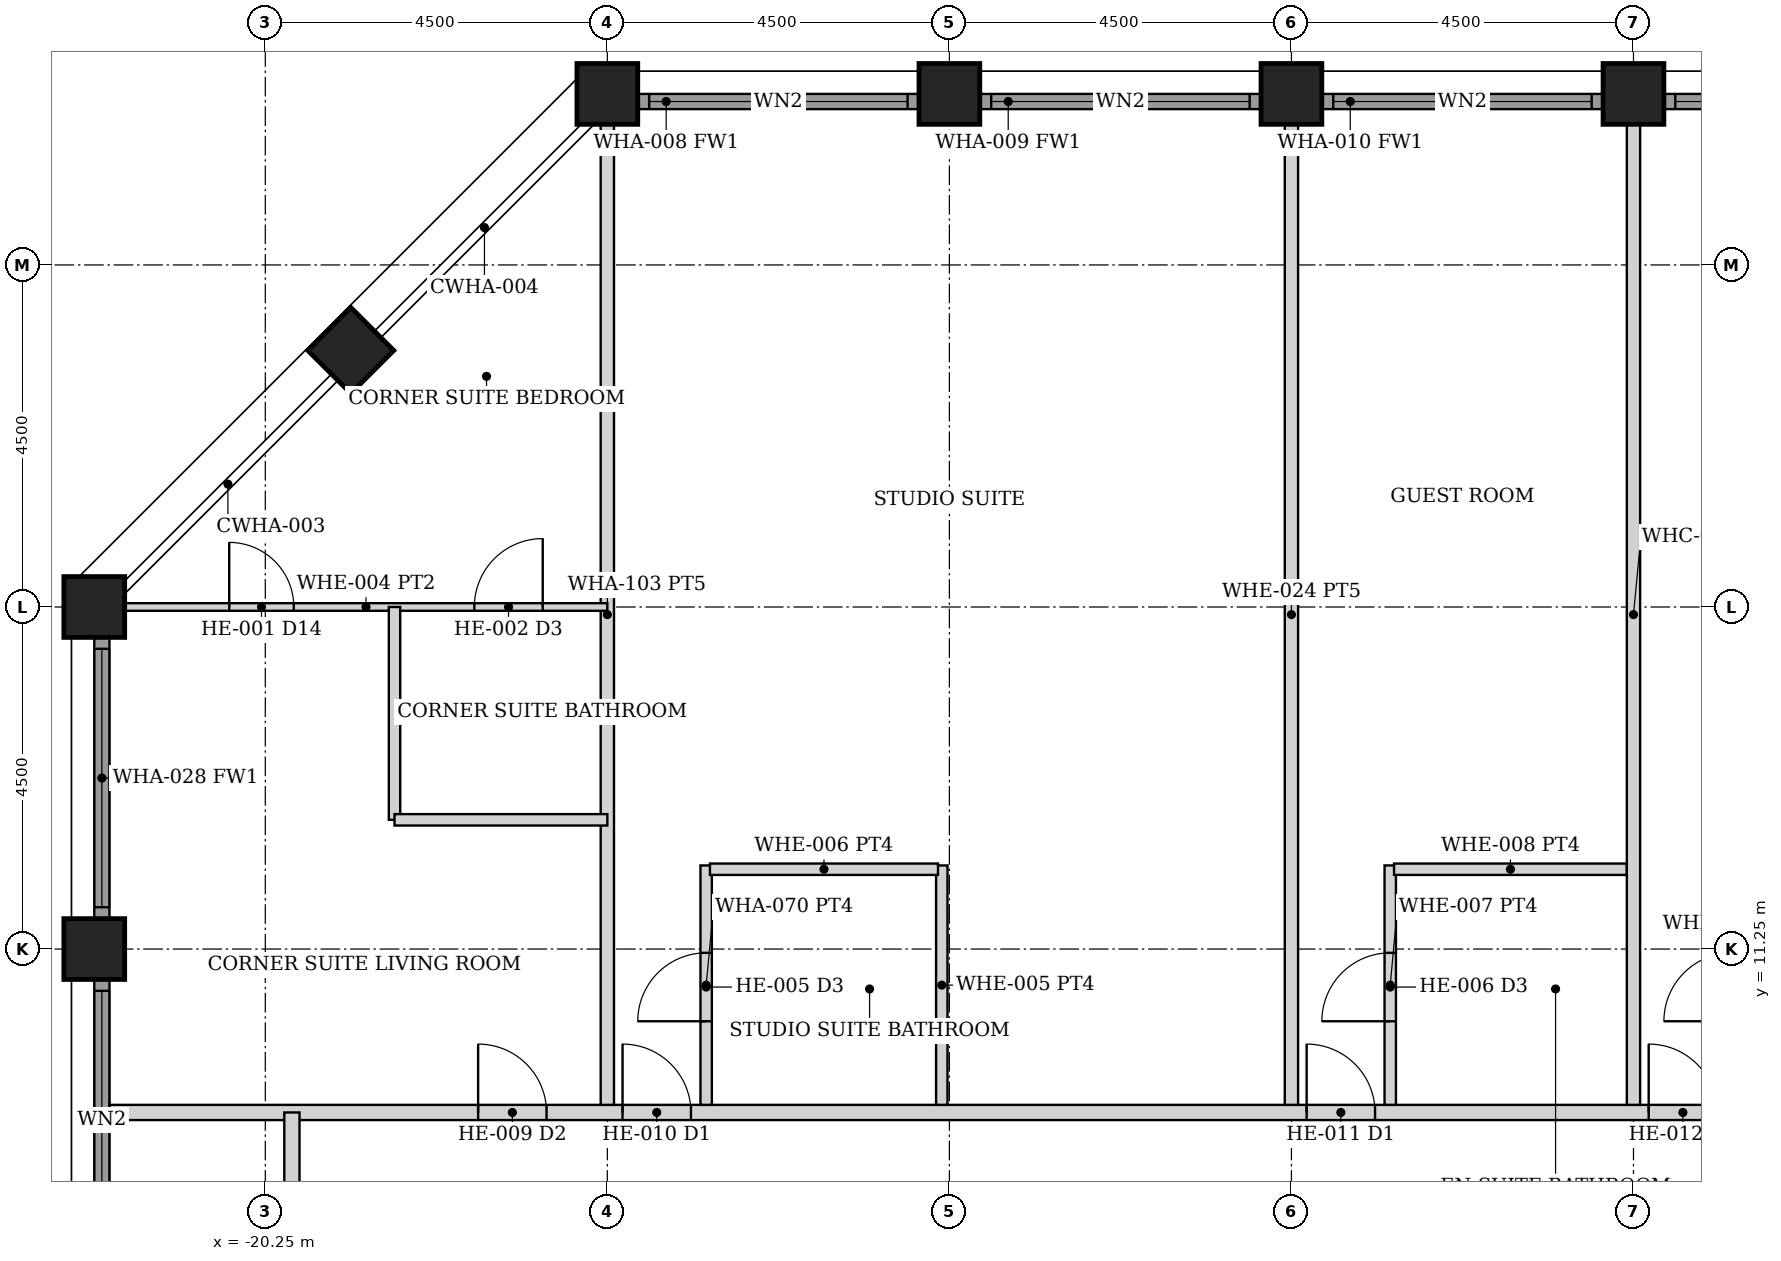
"""IFC4 building model, lengths in metres.
Left out: names, types, materials, properties, quantities, classifications, styles, units other than length and angle.
Written with IfcOpenShell. Run it as: python <this file> out.ifc"""

import sys

from ifc_helpers import new_model, si_unit, direction, frame, frame_2d, origin, origin_2d, place, context, subcontext, project, spatial, rectangle, hollow_rectangle, extrude, element, fill, save


model = new_model("IFC4")
c1 = context("Model", 3, precision=1e-05, world=origin(), true_north=direction((0.0, 1.0)))
c2 = subcontext(c1, "Body", "Model", "MODEL_VIEW")
j1 = project(units=[si_unit("LENGTHUNIT", "METRE"), si_unit("PLANEANGLEUNIT", "RADIAN")], contexts=[c1])
p1 = place(None, origin())
s1 = spatial("IfcSite", under=j1, at=p1, CompositionType="ELEMENT")
p2 = place(p1, origin())
s2 = spatial("IfcBuilding", under=s1, at=p2, CompositionType="ELEMENT")
p3 = place(p2, frame((0.0, 0.0, 161.6)))
s3 = spatial("IfcBuildingStorey", under=s2, at=p3, CompositionType="ELEMENT", Elevation=161.6)
for number, where, z_axis, x_axis in (
    (1, (-15.75, 22.5, 0.0), (0.0, 0.0, 1.0), (0.0, 1.0, 0.0)),
    (2, (-11.25, 22.5, 0.0), (0.0, 0.0, 1.0), (0.0, 1.0, 0.0)),
    (3, (-6.75, 22.5, 0.0), (0.0, 0.0, 1.0), (0.0, 1.0, 0.0)),
    (4, (-2.25, 22.5, 0.0), (0.0, 0.0, 1.0), (0.0, 1.0, 0.0)),
    (5, (-22.5, 11.25, 0.0), (0.0, 0.0, 1.0), (1.0, 0.0, 0.0)),
    (6, (-22.5, 15.75, 0.0), (0.0, 0.0, 1.0), (1.0, 0.0, 0.0)),
    (7, (-19.125, 19.125, 0.0), (0.0, 0.0, 1.0), (0.707, -0.707, 0.0)),
):
    element("IfcColumn", number, at=place(p3, frame(where, z_axis=z_axis, x_axis=x_axis)), inside=s3, PredefinedType="COLUMN", context=c2, shape_type="SweptSolid", body=[
        extrude(hollow_rectangle(XDim=0.8, YDim=0.8, WallThickness=0.05, at=origin_2d()), origin(), (0.0, 0.0, 1.0), 3.6),
    ])
p4 = place(p3, frame((-15.345, 22.4, 0.0), z_axis=(0.0, 0.0, 1.0), x_axis=(1.0, 0.0, 0.0)))
e8 = element("IfcWall", 8, at=p4, inside=s3, PredefinedType="SOLIDWALL", context=c2, shape_type="SweptSolid", body=[
    extrude(rectangle(XDim=3.69, YDim=0.2, at=frame_2d((1.845, 0.0))), origin(), (0.0, 0.0, 1.0), 2.479),
])
p5 = place(p4, frame((0.145, 0.0, 0.3)))
e9 = element("IfcOpeningElement", 9, at=p5, cuts=e8, PredefinedType="OPENING", context=c2, shape_type="SweptSolid", body=[
    extrude(rectangle(XDim=3.4, YDim=2.029, at=frame_2d((1.7, 1.015))), frame((0.0, 0.11, 0.0), z_axis=(0.0, -1.0, 0.0), x_axis=(1.0, 0.0, 0.0)), (0.0, 0.0, 1.0), 0.22),
])
p6 = place(p3, frame((-10.845, 22.4, 0.0), z_axis=(0.0, 0.0, 1.0), x_axis=(1.0, 0.0, 0.0)))
e10 = element("IfcWall", 10, at=p6, inside=s3, PredefinedType="SOLIDWALL", context=c2, shape_type="SweptSolid", body=[
    extrude(rectangle(XDim=3.69, YDim=0.2, at=frame_2d((1.845, 0.0))), origin(), (0.0, 0.0, 1.0), 2.479),
])
p7 = place(p6, frame((0.145, 0.0, 0.3)))
e11 = element("IfcOpeningElement", 11, at=p7, cuts=e10, PredefinedType="OPENING", context=c2, shape_type="SweptSolid", body=[
    extrude(rectangle(XDim=3.4, YDim=2.029, at=frame_2d((1.7, 1.015))), frame((0.0, 0.11, 0.0), z_axis=(0.0, -1.0, 0.0), x_axis=(1.0, 0.0, 0.0)), (0.0, 0.0, 1.0), 0.22),
])
p8 = place(p3, frame((-6.345, 22.4, 0.0), z_axis=(0.0, 0.0, 1.0), x_axis=(1.0, 0.0, 0.0)))
e12 = element("IfcWall", 12, at=p8, inside=s3, PredefinedType="SOLIDWALL", context=c2, shape_type="SweptSolid", body=[
    extrude(rectangle(XDim=3.69, YDim=0.2, at=frame_2d((1.845, 0.0))), origin(), (0.0, 0.0, 1.0), 2.479),
])
p9 = place(p8, frame((0.145, 0.0, 0.3)))
e13 = element("IfcOpeningElement", 13, at=p9, cuts=e12, PredefinedType="OPENING", context=c2, shape_type="SweptSolid", body=[
    extrude(rectangle(XDim=3.4, YDim=2.029, at=frame_2d((1.7, 1.015))), frame((0.0, 0.11, 0.0), z_axis=(0.0, -1.0, 0.0), x_axis=(1.0, 0.0, 0.0)), (0.0, 0.0, 1.0), 0.22),
])
p10 = place(p3, frame((-1.845, 22.4, 0.0), z_axis=(0.0, 0.0, 1.0), x_axis=(1.0, 0.0, 0.0)))
e14 = element("IfcWall", 14, at=p10, inside=s3, PredefinedType="SOLIDWALL", context=c2, shape_type="SweptSolid", body=[
    extrude(rectangle(XDim=3.69, YDim=0.2, at=frame_2d((1.845, 0.0))), origin(), (0.0, 0.0, 1.0), 2.479),
])
p11 = place(p10, frame((0.145, 0.0, 0.3)))
e15 = element("IfcOpeningElement", 15, at=p11, cuts=e14, PredefinedType="OPENING", context=c2, shape_type="SweptSolid", body=[
    extrude(rectangle(XDim=3.4, YDim=2.029, at=frame_2d((1.7, 1.015))), frame((0.0, 0.11, 0.0), z_axis=(0.0, -1.0, 0.0), x_axis=(1.0, 0.0, 0.0)), (0.0, 0.0, 1.0), 0.22),
])
p12 = place(p3, frame((-22.4, 7.155, 0.0), z_axis=(0.0, 0.0, 1.0), x_axis=(0.0, 1.0, 0.0)))
e16 = element("IfcWall", 16, at=p12, inside=s3, PredefinedType="SOLIDWALL", context=c2, shape_type="SweptSolid", body=[
    extrude(rectangle(XDim=3.69, YDim=0.2, at=frame_2d((1.845, 0.0))), origin(), (0.0, 0.0, 1.0), 2.479),
])
p13 = place(p12, frame((0.145, 0.0, 0.3)))
e17 = element("IfcOpeningElement", 17, at=p13, cuts=e16, PredefinedType="OPENING", context=c2, shape_type="SweptSolid", body=[
    extrude(rectangle(XDim=3.4, YDim=2.029, at=frame_2d((1.7, 1.015))), frame((0.0, 0.11, 0.0), z_axis=(0.0, -1.0, 0.0), x_axis=(1.0, 0.0, 0.0)), (0.0, 0.0, 1.0), 0.22),
])
p14 = place(p3, frame((-22.4, 11.655, 0.0), z_axis=(0.0, 0.0, 1.0), x_axis=(0.0, 1.0, 0.0)))
e18 = element("IfcWall", 18, at=p14, inside=s3, PredefinedType="SOLIDWALL", context=c2, shape_type="SweptSolid", body=[
    extrude(rectangle(XDim=3.69, YDim=0.2, at=frame_2d((1.845, 0.0))), origin(), (0.0, 0.0, 1.0), 2.479),
])
p15 = place(p14, frame((0.145, 0.0, 0.3)))
e19 = element("IfcOpeningElement", 19, at=p15, cuts=e18, PredefinedType="OPENING", context=c2, shape_type="SweptSolid", body=[
    extrude(rectangle(XDim=3.4, YDim=2.029, at=frame_2d((1.7, 1.015))), frame((0.0, 0.11, 0.0), z_axis=(0.0, -1.0, 0.0), x_axis=(1.0, 0.0, 0.0)), (0.0, 0.0, 1.0), 0.22),
])
p16 = place(p3, frame((-22.3, 9.1, 0.0), z_axis=(0.0, 0.0, 1.0), x_axis=(1.0, 0.0, 0.0)))
e20 = element("IfcWall", 20, at=p16, inside=s3, PredefinedType="PARTITIONING", context=c2, shape_type="SweptSolid", body=[
    extrude(rectangle(XDim=44.6, YDim=0.2, at=frame_2d((22.3, 0.0))), origin(), (0.0, 0.0, 1.0), 2.473),
])
p17 = place(p16, frame((6.75, 0.0, 0.0)))
e21 = element("IfcOpeningElement", 21, at=p17, cuts=e20, PredefinedType="OPENING", context=c2, shape_type="SweptSolid", body=[
    extrude(rectangle(XDim=0.9, YDim=2.1, at=frame_2d((0.45, 1.05))), frame((0.0, 0.11, 0.0), z_axis=(0.0, -1.0, 0.0), x_axis=(1.0, 0.0, 0.0)), (0.0, 0.0, 1.0), 0.22),
])
p18 = place(p16, frame((15.75, 0.0, 0.0)))
e22 = element("IfcOpeningElement", 22, at=p18, cuts=e20, PredefinedType="OPENING", context=c2, shape_type="SweptSolid", body=[
    extrude(rectangle(XDim=0.9, YDim=2.1, at=frame_2d((0.45, 1.05))), frame((0.0, 0.11, 0.0), z_axis=(0.0, -1.0, 0.0), x_axis=(1.0, 0.0, 0.0)), (0.0, 0.0, 1.0), 0.22),
])
p19 = place(p16, frame((20.25, 0.0, 0.0)))
e23 = element("IfcOpeningElement", 23, at=p19, cuts=e20, PredefinedType="OPENING", context=c2, shape_type="SweptSolid", body=[
    extrude(rectangle(XDim=0.9, YDim=2.1, at=frame_2d((0.45, 1.05))), frame((0.0, 0.11, 0.0), z_axis=(0.0, -1.0, 0.0), x_axis=(1.0, 0.0, 0.0)), (0.0, 0.0, 1.0), 0.22),
])
p20 = place(p16, frame((36.95, 0.0, 0.0)))
e24 = element("IfcOpeningElement", 24, at=p20, cuts=e20, PredefinedType="OPENING", context=c2, shape_type="SweptSolid", body=[
    extrude(rectangle(XDim=0.9, YDim=2.1, at=frame_2d((0.45, 1.05))), frame((0.0, 0.11, 0.0), z_axis=(0.0, -1.0, 0.0), x_axis=(1.0, 0.0, 0.0)), (0.0, 0.0, 1.0), 0.22),
])
p21 = place(p16, frame((38.85, 0.0, 0.0)))
e25 = element("IfcOpeningElement", 25, at=p21, cuts=e20, PredefinedType="OPENING", context=c2, shape_type="SweptSolid", body=[
    extrude(rectangle(XDim=0.9, YDim=2.1, at=frame_2d((0.45, 1.05))), frame((0.0, 0.11, 0.0), z_axis=(0.0, -1.0, 0.0), x_axis=(1.0, 0.0, 0.0)), (0.0, 0.0, 1.0), 0.22),
])
p22 = place(p16, frame((4.85, 0.0, 0.0)))
e26 = element("IfcOpeningElement", 26, at=p22, cuts=e20, PredefinedType="OPENING", context=c2, shape_type="SweptSolid", body=[
    extrude(rectangle(XDim=0.9, YDim=2.1, at=frame_2d((0.45, 1.05))), frame((0.0, 0.11, 0.0), z_axis=(0.0, -1.0, 0.0), x_axis=(1.0, 0.0, 0.0)), (0.0, 0.0, 1.0), 0.22),
])
p23 = place(p3, frame((-19.9, -9.1, 0.0), z_axis=(0.0, 0.0, 1.0), x_axis=(0.0, 1.0, 0.0)))
e27 = element("IfcWall", 27, at=p23, inside=s3, PredefinedType="PARTITIONING", context=c2, shape_type="SweptSolid", body=[
    extrude(rectangle(XDim=18.2, YDim=0.2, at=frame_2d((9.1, 0.0))), origin(), (0.0, 0.0, 1.0), 2.473),
])
p24 = place(p23, frame((8.6, 0.0, 0.0)))
e28 = element("IfcOpeningElement", 28, at=p24, cuts=e27, PredefinedType="OPENING", context=c2, shape_type="SweptSolid", body=[
    extrude(rectangle(XDim=1.0, YDim=2.1, at=frame_2d((0.5, 1.05))), frame((0.0, 0.11, 0.0), z_axis=(0.0, -1.0, 0.0), x_axis=(1.0, 0.0, 0.0)), (0.0, 0.0, 1.0), 0.22),
])
p25 = place(p3, frame((-14.45, 9.2, 0.0), z_axis=(0.0, 0.0, 1.0), x_axis=(0.0, 1.0, 0.0)))
e29 = element("IfcWall", 29, at=p25, inside=s3, PredefinedType="PARTITIONING", context=c2, shape_type="SweptSolid", body=[
    extrude(rectangle(XDim=3.15, YDim=0.15, at=frame_2d((1.575, 0.0))), origin(), (0.0, 0.0, 1.0), 2.473),
])
p26 = place(p25, frame((1.1, 0.0, 0.0)))
e30 = element("IfcOpeningElement", 30, at=p26, cuts=e29, PredefinedType="OPENING", context=c2, shape_type="SweptSolid", body=[
    extrude(rectangle(XDim=0.9, YDim=2.1, at=frame_2d((0.45, 1.05))), frame((0.0, 0.085, 0.0), z_axis=(0.0, -1.0, 0.0), x_axis=(1.0, 0.0, 0.0)), (0.0, 0.0, 1.0), 0.17),
])
p27 = place(p3, frame((-11.35, 9.2, 0.0), z_axis=(0.0, 0.0, 1.0), x_axis=(0.0, 1.0, 0.0)))
e31 = element("IfcWall", 31, at=p27, inside=s3, PredefinedType="PARTITIONING", context=c2, shape_type="SweptSolid", body=[
    extrude(rectangle(XDim=3.15, YDim=0.15, at=frame_2d((1.575, 0.0))), origin(), (0.0, 0.0, 1.0), 2.473),
])
p28 = place(p3, frame((-14.4, 12.3, 0.0), z_axis=(0.0, 0.0, 1.0), x_axis=(1.0, 0.0, 0.0)))
e32 = element("IfcWall", 32, at=p28, inside=s3, PredefinedType="PARTITIONING", context=c2, shape_type="SweptSolid", body=[
    extrude(rectangle(XDim=3.0, YDim=0.15, at=frame_2d((1.5, 0.0))), origin(), (0.0, 0.0, 1.0), 2.473),
])
p29 = place(p3, frame((-5.45, 9.2, 0.0), z_axis=(0.0, 0.0, 1.0), x_axis=(0.0, 1.0, 0.0)))
e33 = element("IfcWall", 33, at=p29, inside=s3, PredefinedType="PARTITIONING", context=c2, shape_type="SweptSolid", body=[
    extrude(rectangle(XDim=3.15, YDim=0.15, at=frame_2d((1.575, 0.0))), origin(), (0.0, 0.0, 1.0), 2.473),
])
p30 = place(p29, frame((1.1, 0.0, 0.0)))
e34 = element("IfcOpeningElement", 34, at=p30, cuts=e33, PredefinedType="OPENING", context=c2, shape_type="SweptSolid", body=[
    extrude(rectangle(XDim=0.9, YDim=2.1, at=frame_2d((0.45, 1.05))), frame((0.0, 0.085, 0.0), z_axis=(0.0, -1.0, 0.0), x_axis=(1.0, 0.0, 0.0)), (0.0, 0.0, 1.0), 0.17),
])
p31 = place(p3, frame((-5.4, 12.3, 0.0), z_axis=(0.0, 0.0, 1.0), x_axis=(1.0, 0.0, 0.0)))
e35 = element("IfcWall", 35, at=p31, inside=s3, PredefinedType="PARTITIONING", context=c2, shape_type="SweptSolid", body=[
    extrude(rectangle(XDim=3.062, YDim=0.15, at=frame_2d((1.531, 0.0))), origin(), (0.0, 0.0, 1.0), 2.473),
])
for number, where, z_axis, x_axis in (
    (36, (-15.75, 9.2, 0.0), (0.0, 0.0, 1.0), (0.0, 1.0, 0.0)),
    (37, (-6.75, 9.2, 0.0), (0.0, 0.0, 1.0), (0.0, 1.0, 0.0)),
    (38, (-2.25, 9.2, 0.0), (0.0, 0.0, 1.0), (0.0, 1.0, 0.0)),
):
    element("IfcWall", number, at=place(p3, frame(where, z_axis=z_axis, x_axis=x_axis)), inside=s3, PredefinedType="PARTITIONING", context=c2, shape_type="SweptSolid", body=[
        extrude(rectangle(XDim=12.9, YDim=0.175, at=frame_2d((6.45, 0.0))), origin(), (0.0, 0.0, 1.0), 2.473),
    ])
p32 = place(p3, frame((-22.1, 15.75, 0.0), z_axis=(0.0, 0.0, 1.0), x_axis=(1.0, 0.0, 0.0)))
e39 = element("IfcWall", 39, at=p32, inside=s3, PredefinedType="PARTITIONING", context=c2, shape_type="SweptSolid", body=[
    extrude(rectangle(XDim=6.35, YDim=0.1, at=frame_2d((3.175, 0.0))), origin(), (0.0, 0.0, 1.0), 2.473),
])
p33 = place(p32, frame((1.375, 0.0, 0.0)))
e40 = element("IfcOpeningElement", 40, at=p33, cuts=e39, PredefinedType="OPENING", context=c2, shape_type="SweptSolid", body=[
    extrude(rectangle(XDim=0.85, YDim=2.1, at=frame_2d((0.425, 1.05))), frame((0.0, 0.06, 0.0), z_axis=(0.0, -1.0, 0.0), x_axis=(1.0, 0.0, 0.0)), (0.0, 0.0, 1.0), 0.12),
])
p34 = place(p32, frame((4.6, 0.0, 0.0)))
e41 = element("IfcOpeningElement", 41, at=p34, cuts=e39, PredefinedType="OPENING", context=c2, shape_type="SweptSolid", body=[
    extrude(rectangle(XDim=0.9, YDim=2.1, at=frame_2d((0.45, 1.05))), frame((0.0, 0.06, 0.0), z_axis=(0.0, -1.0, 0.0), x_axis=(1.0, 0.0, 0.0)), (0.0, 0.0, 1.0), 0.12),
])
for number, where, z_axis, x_axis in (
    (42, (-18.55, 12.95, 0.0), (0.0, 0.0, 1.0), (0.0, 1.0, 0.0)),
    (43, (-18.55, 12.95, 0.0), (0.0, 0.0, 1.0), (1.0, 0.0, 0.0)),
):
    element("IfcWall", number, at=place(p3, frame(where, z_axis=z_axis, x_axis=x_axis)), inside=s3, PredefinedType="PARTITIONING", context=c2, shape_type="SweptSolid", body=[
        extrude(rectangle(XDim=2.8, YDim=0.15, at=frame_2d((1.4, 0.0))), origin(), (0.0, 0.0, 1.0), 2.473),
    ])
p35 = place(p5, origin())
e44 = element("IfcWindow", 44, at=p35, inside=s3, PartitioningType="SINGLE_PANEL", PredefinedType="WINDOW", context=c2, shape_type="SweptSolid", body=[
    extrude(rectangle(XDim=3.4, YDim=2.029, at=frame_2d((1.7, 1.015))), frame((0.0, 0.03, 0.0), z_axis=(0.0, -1.0, 0.0), x_axis=(1.0, 0.0, 0.0)), (0.0, 0.0, 1.0), 0.06),
])
fill(e9, e44)
p36 = place(p7, origin())
e45 = element("IfcWindow", 45, at=p36, inside=s3, PartitioningType="SINGLE_PANEL", PredefinedType="WINDOW", context=c2, shape_type="SweptSolid", body=[
    extrude(rectangle(XDim=3.4, YDim=2.029, at=frame_2d((1.7, 1.015))), frame((0.0, 0.03, 0.0), z_axis=(0.0, -1.0, 0.0), x_axis=(1.0, 0.0, 0.0)), (0.0, 0.0, 1.0), 0.06),
])
fill(e11, e45)
p37 = place(p9, origin())
e46 = element("IfcWindow", 46, at=p37, inside=s3, PartitioningType="SINGLE_PANEL", PredefinedType="WINDOW", context=c2, shape_type="SweptSolid", body=[
    extrude(rectangle(XDim=3.4, YDim=2.029, at=frame_2d((1.7, 1.015))), frame((0.0, 0.03, 0.0), z_axis=(0.0, -1.0, 0.0), x_axis=(1.0, 0.0, 0.0)), (0.0, 0.0, 1.0), 0.06),
])
fill(e13, e46)
p38 = place(p11, origin())
e47 = element("IfcWindow", 47, at=p38, inside=s3, PartitioningType="SINGLE_PANEL", PredefinedType="WINDOW", context=c2, shape_type="SweptSolid", body=[
    extrude(rectangle(XDim=3.4, YDim=2.029, at=frame_2d((1.7, 1.015))), frame((0.0, 0.03, 0.0), z_axis=(0.0, -1.0, 0.0), x_axis=(1.0, 0.0, 0.0)), (0.0, 0.0, 1.0), 0.06),
])
fill(e15, e47)
p39 = place(p13, origin())
e48 = element("IfcWindow", 48, at=p39, inside=s3, PartitioningType="SINGLE_PANEL", PredefinedType="WINDOW", context=c2, shape_type="SweptSolid", body=[
    extrude(rectangle(XDim=3.4, YDim=2.029, at=frame_2d((1.7, 1.015))), frame((0.0, 0.03, 0.0), z_axis=(0.0, -1.0, 0.0), x_axis=(1.0, 0.0, 0.0)), (0.0, 0.0, 1.0), 0.06),
])
fill(e17, e48)
p40 = place(p15, origin())
e49 = element("IfcWindow", 49, at=p40, inside=s3, PartitioningType="SINGLE_PANEL", PredefinedType="WINDOW", context=c2, shape_type="SweptSolid", body=[
    extrude(rectangle(XDim=3.4, YDim=2.029, at=frame_2d((1.7, 1.015))), frame((0.0, 0.03, 0.0), z_axis=(0.0, -1.0, 0.0), x_axis=(1.0, 0.0, 0.0)), (0.0, 0.0, 1.0), 0.06),
])
fill(e19, e49)
p41 = place(p17, origin())
e50 = element("IfcDoor", 50, at=p41, inside=s3, OperationType="SINGLE_SWING_LEFT", PredefinedType="DOOR", context=c2, shape_type="SweptSolid", body=[
    extrude(rectangle(XDim=0.9, YDim=2.1, at=frame_2d((0.45, 1.05))), frame((0.0, 0.025, 0.0), z_axis=(0.0, -1.0, 0.0), x_axis=(1.0, 0.0, 0.0)), (0.0, 0.0, 1.0), 0.05),
])
fill(e21, e50)
p42 = place(p26, origin())
e51 = element("IfcDoor", 51, at=p42, inside=s3, OperationType="SINGLE_SWING_LEFT", PredefinedType="DOOR", context=c2, shape_type="SweptSolid", body=[
    extrude(rectangle(XDim=0.9, YDim=2.1, at=frame_2d((0.45, 1.05))), frame((0.0, 0.025, 0.0), z_axis=(0.0, -1.0, 0.0), x_axis=(1.0, 0.0, 0.0)), (0.0, 0.0, 1.0), 0.05),
])
fill(e30, e51)
p43 = place(p18, origin())
e52 = element("IfcDoor", 52, at=p43, inside=s3, OperationType="SINGLE_SWING_LEFT", PredefinedType="DOOR", context=c2, shape_type="SweptSolid", body=[
    extrude(rectangle(XDim=0.9, YDim=2.1, at=frame_2d((0.45, 1.05))), frame((0.0, 0.025, 0.0), z_axis=(0.0, -1.0, 0.0), x_axis=(1.0, 0.0, 0.0)), (0.0, 0.0, 1.0), 0.05),
])
fill(e22, e52)
p44 = place(p30, origin())
e53 = element("IfcDoor", 53, at=p44, inside=s3, OperationType="SINGLE_SWING_LEFT", PredefinedType="DOOR", context=c2, shape_type="SweptSolid", body=[
    extrude(rectangle(XDim=0.9, YDim=2.1, at=frame_2d((0.45, 1.05))), frame((0.0, 0.025, 0.0), z_axis=(0.0, -1.0, 0.0), x_axis=(1.0, 0.0, 0.0)), (0.0, 0.0, 1.0), 0.05),
])
fill(e34, e53)
p45 = place(p19, origin())
e54 = element("IfcDoor", 54, at=p45, inside=s3, OperationType="SINGLE_SWING_LEFT", PredefinedType="DOOR", context=c2, shape_type="SweptSolid", body=[
    extrude(rectangle(XDim=0.9, YDim=2.1, at=frame_2d((0.45, 1.05))), frame((0.0, 0.025, 0.0), z_axis=(0.0, -1.0, 0.0), x_axis=(1.0, 0.0, 0.0)), (0.0, 0.0, 1.0), 0.05),
])
fill(e23, e54)
p46 = place(p22, origin())
e55 = element("IfcDoor", 55, at=p46, inside=s3, OperationType="SINGLE_SWING_LEFT", PredefinedType="DOOR", context=c2, shape_type="SweptSolid", body=[
    extrude(rectangle(XDim=0.9, YDim=2.1, at=frame_2d((0.45, 1.05))), frame((0.0, 0.025, 0.0), z_axis=(0.0, -1.0, 0.0), x_axis=(1.0, 0.0, 0.0)), (0.0, 0.0, 1.0), 0.05),
])
fill(e26, e55)
p47 = place(p33, origin())
e56 = element("IfcDoor", 56, at=p47, inside=s3, OperationType="SINGLE_SWING_LEFT", PredefinedType="DOOR", context=c2, shape_type="SweptSolid", body=[
    extrude(rectangle(XDim=0.85, YDim=2.1, at=frame_2d((0.425, 1.05))), frame((0.0, 0.025, 0.0), z_axis=(0.0, -1.0, 0.0), x_axis=(1.0, 0.0, 0.0)), (0.0, 0.0, 1.0), 0.05),
])
fill(e40, e56)
p48 = place(p34, origin())
e57 = element("IfcDoor", 57, at=p48, inside=s3, OperationType="SINGLE_SWING_RIGHT", PredefinedType="DOOR", context=c2, shape_type="SweptSolid", body=[
    extrude(rectangle(XDim=0.9, YDim=2.1, at=frame_2d((0.45, 1.05))), frame((0.0, 0.025, 0.0), z_axis=(0.0, -1.0, 0.0), x_axis=(1.0, 0.0, 0.0)), (0.0, 0.0, 1.0), 0.05),
])
fill(e41, e57)
save(model, sys.argv[1])
